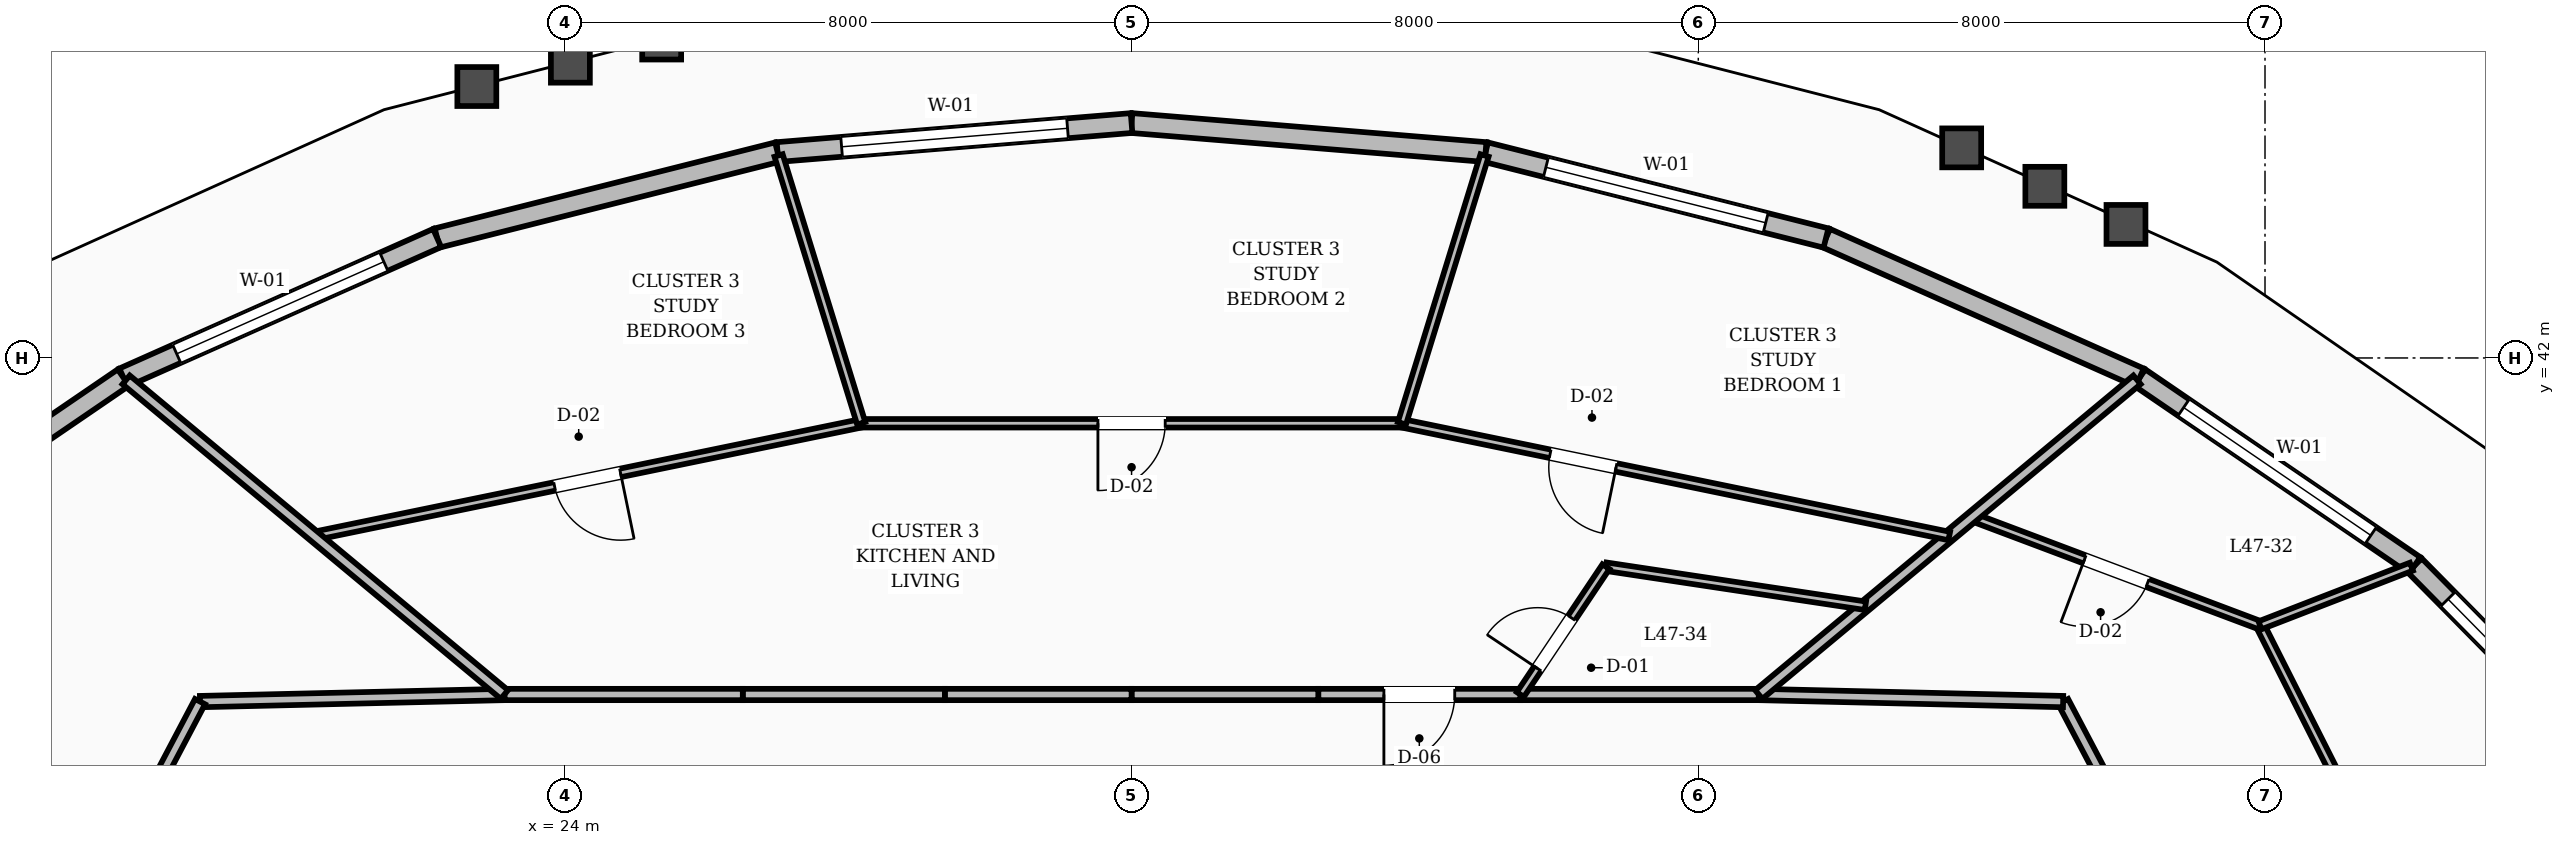
"""IFC4 building model, lengths in metres.
Left out: names, types, materials, properties, quantities, classifications, styles, units other than length and angle.
Written with IfcOpenShell. Run it as: python <this file> out.ifc"""

import sys

from ifc_helpers import new_model, si_unit, direction, frame, frame_2d, origin, place, context, subcontext, project, spatial, rectangle, extrude, element, fill, save


model = new_model("IFC4")
c1 = context("Model", 3, precision=1e-05, world=origin(), true_north=direction((0.0, 1.0)))
c2 = subcontext(c1, "Body", "Model", "MODEL_VIEW")
j1 = project(units=[si_unit("LENGTHUNIT", "METRE"), si_unit("PLANEANGLEUNIT", "RADIAN")], contexts=[c1])
p1 = place(None, origin())
s1 = spatial("IfcSite", under=j1, at=p1, CompositionType="ELEMENT")
p2 = place(p1, origin())
s2 = spatial("IfcBuilding", under=s1, at=p2, CompositionType="ELEMENT")
p3 = place(p2, frame((0.0, 0.0, 182.0)))
s3 = spatial("IfcBuildingStorey", under=s2, at=p3, CompositionType="ELEMENT", Elevation=182.0)
p4 = place(p3, frame((53.299, 35.842, 0.0), z_axis=(0.0, 0.0, 1.0), x_axis=(-0.70219293187, 0.711986717876, 0.0)))
e1 = element("IfcWall", 1, at=p4, inside=s3, PredefinedType="STANDARD", context=c2, shape_type="SweptSolid", body=[
    extrude(rectangle(XDim=4.537, YDim=0.28, at=frame_2d((2.269, 0.0))), origin(), (0.0, 0.0, 1.0), 2.82),
])
p5 = place(p4, frame((0.668, 0.0, 0.8)))
e2 = element("IfcOpeningElement", 2, at=p5, cuts=e1, PredefinedType="OPENING", context=c2, shape_type="SweptSolid", body=[
    extrude(rectangle(XDim=3.2, YDim=1.65, at=frame_2d((1.6, 0.825))), frame((0.0, 0.15, 0.0), z_axis=(0.0, -1.0, 0.0), x_axis=(1.0, 0.0, 0.0)), (0.0, 0.0, 1.0), 0.3),
])
p6 = place(p3, frame((50.113, 39.073, 0.0), z_axis=(0.0, 0.0, 1.0), x_axis=(-0.825797441916, 0.563966829632, 0.0)))
e3 = element("IfcWall", 3, at=p6, inside=s3, PredefinedType="STANDARD", context=c2, shape_type="SweptSolid", body=[
    extrude(rectangle(XDim=4.7, YDim=0.28, at=frame_2d((2.35, 0.0))), origin(), (0.0, 0.0, 1.0), 2.82),
])
p7 = place(p6, frame((0.75, 0.0, 0.8)))
e4 = element("IfcOpeningElement", 4, at=p7, cuts=e3, PredefinedType="OPENING", context=c2, shape_type="SweptSolid", body=[
    extrude(rectangle(XDim=3.2, YDim=1.65, at=frame_2d((1.6, 0.825))), frame((0.0, 0.15, 0.0), z_axis=(0.0, -1.0, 0.0), x_axis=(1.0, 0.0, 0.0)), (0.0, 0.0, 1.0), 0.3),
])
p8 = place(p3, frame((46.232, 41.723, 0.0), z_axis=(0.0, 0.0, 1.0), x_axis=(-0.913703507389, 0.406381471754, 0.0)))
e5 = element("IfcWall", 5, at=p8, inside=s3, PredefinedType="STANDARD", context=c2, shape_type="SweptSolid", body=[
    extrude(rectangle(XDim=4.847, YDim=0.28, at=frame_2d((2.423, 0.0))), origin(), (0.0, 0.0, 1.0), 2.82),
])
p9 = place(p3, frame((41.803, 43.693, 0.0), z_axis=(0.0, 0.0, 1.0), x_axis=(-0.96958067748, 0.244771954803, 0.0)))
e6 = element("IfcWall", 6, at=p9, inside=s3, PredefinedType="STANDARD", context=c2, shape_type="SweptSolid", body=[
    extrude(rectangle(XDim=4.956, YDim=0.28, at=frame_2d((2.478, 0.0))), origin(), (0.0, 0.0, 1.0), 2.82),
])
p10 = place(p9, frame((0.878, 0.0, 0.8)))
e7 = element("IfcOpeningElement", 7, at=p10, cuts=e6, PredefinedType="OPENING", context=c2, shape_type="SweptSolid", body=[
    extrude(rectangle(XDim=3.2, YDim=1.65, at=frame_2d((1.6, 0.825))), frame((0.0, 0.15, 0.0), z_axis=(0.0, -1.0, 0.0), x_axis=(1.0, 0.0, 0.0)), (0.0, 0.0, 1.0), 0.3),
])
p11 = place(p3, frame((36.998, 44.906, 0.0), z_axis=(0.0, 0.0, 1.0), x_axis=(-0.996657001312, 0.081699582228, 0.0)))
e8 = element("IfcWall", 8, at=p11, inside=s3, PredefinedType="STANDARD", context=c2, shape_type="SweptSolid", body=[
    extrude(rectangle(XDim=5.014, YDim=0.28, at=frame_2d((2.507, 0.0))), origin(), (0.0, 0.0, 1.0), 2.82),
])
p12 = place(p3, frame((32.0, 45.316, 0.0), z_axis=(0.0, 0.0, 1.0), x_axis=(-0.996657001312, -0.081699582228, 0.0)))
e9 = element("IfcWall", 9, at=p12, inside=s3, PredefinedType="STANDARD", context=c2, shape_type="SweptSolid", body=[
    extrude(rectangle(XDim=5.014, YDim=0.28, at=frame_2d((2.507, 0.0))), origin(), (0.0, 0.0, 1.0), 2.82),
])
p13 = place(p12, frame((0.907, 0.0, 0.8)))
e10 = element("IfcOpeningElement", 10, at=p13, cuts=e9, PredefinedType="OPENING", context=c2, shape_type="SweptSolid", body=[
    extrude(rectangle(XDim=3.2, YDim=1.65, at=frame_2d((1.6, 0.825))), frame((0.0, 0.15, 0.0), z_axis=(0.0, -1.0, 0.0), x_axis=(1.0, 0.0, 0.0)), (0.0, 0.0, 1.0), 0.3),
])
p14 = place(p3, frame((27.002, 44.906, 0.0), z_axis=(0.0, 0.0, 1.0), x_axis=(-0.96958067748, -0.244771954803, 0.0)))
e11 = element("IfcWall", 11, at=p14, inside=s3, PredefinedType="STANDARD", context=c2, shape_type="SweptSolid", body=[
    extrude(rectangle(XDim=4.956, YDim=0.28, at=frame_2d((2.478, 0.0))), origin(), (0.0, 0.0, 1.0), 2.82),
])
p15 = place(p3, frame((22.197, 43.693, 0.0), z_axis=(0.0, 0.0, 1.0), x_axis=(-0.913703507389, -0.406381471754, 0.0)))
e12 = element("IfcWall", 12, at=p15, inside=s3, PredefinedType="STANDARD", context=c2, shape_type="SweptSolid", body=[
    extrude(rectangle(XDim=4.847, YDim=0.28, at=frame_2d((2.423, 0.0))), origin(), (0.0, 0.0, 1.0), 2.82),
])
p16 = place(p15, frame((0.823, 0.0, 0.8)))
e13 = element("IfcOpeningElement", 13, at=p16, cuts=e12, PredefinedType="OPENING", context=c2, shape_type="SweptSolid", body=[
    extrude(rectangle(XDim=3.2, YDim=1.65, at=frame_2d((1.6, 0.825))), frame((0.0, 0.15, 0.0), z_axis=(0.0, -1.0, 0.0), x_axis=(1.0, 0.0, 0.0)), (0.0, 0.0, 1.0), 0.3),
])
p17 = place(p3, frame((17.768, 41.723, 0.0), z_axis=(0.0, 0.0, 1.0), x_axis=(-0.825797441916, -0.563966829632, 0.0)))
e14 = element("IfcWall", 14, at=p17, inside=s3, PredefinedType="STANDARD", context=c2, shape_type="SweptSolid", body=[
    extrude(rectangle(XDim=4.7, YDim=0.28, at=frame_2d((2.35, 0.0))), origin(), (0.0, 0.0, 1.0), 2.82),
])
p18 = place(p3, frame((46.85, 33.923, 0.0), z_axis=(0.0, 0.0, 1.0), x_axis=(-0.466093963429, 0.884735224378, 0.0)))
e15 = element("IfcWall", 15, at=p18, inside=s3, PredefinedType="SOLIDWALL", context=c2, shape_type="SweptSolid", body=[
    extrude(rectangle(XDim=3.648, YDim=0.16, at=frame_2d((1.824, 0.0))), origin(), (0.0, 0.0, 1.0), 2.8),
])
p19 = place(p3, frame((45.15, 37.15, 0.0), z_axis=(0.0, 0.0, 1.0), x_axis=(-0.999728709658, 0.023291781507, 0.0)))
e16 = element("IfcWall", 16, at=p19, inside=s3, PredefinedType="SOLIDWALL", context=c2, shape_type="SweptSolid", body=[
    extrude(rectangle(XDim=4.298, YDim=0.16, at=frame_2d((2.149, 0.0))), origin(), (0.0, 0.0, 1.0), 2.8),
])
p20 = place(p3, frame((40.854, 37.25, 0.0), z_axis=(0.0, 0.0, 1.0), x_axis=(-1.0, 0.0, 0.0)))
e17 = element("IfcWall", 17, at=p20, inside=s3, PredefinedType="SOLIDWALL", context=c2, shape_type="SweptSolid", body=[
    extrude(rectangle(XDim=3.365, YDim=0.16, at=frame_2d((1.683, 0.0))), origin(), (0.0, 0.0, 1.0), 2.8),
])
p21 = place(p3, frame((37.488, 37.25, 0.0), z_axis=(0.0, 0.0, 1.0), x_axis=(-1.0, 0.0, 0.0)))
e18 = element("IfcWall", 18, at=p21, inside=s3, PredefinedType="SOLIDWALL", context=c2, shape_type="SweptSolid", body=[
    extrude(rectangle(XDim=2.853, YDim=0.16, at=frame_2d((1.426, 0.0))), origin(), (0.0, 0.0, 1.0), 2.8),
])
p22 = place(p21, frame((0.927, 0.0, 0.0)))
e19 = element("IfcOpeningElement", 19, at=p22, cuts=e18, PredefinedType="OPENING", context=c2, shape_type="SweptSolid", body=[
    extrude(rectangle(XDim=1.0, YDim=2.1, at=frame_2d((0.5, 1.05))), frame((0.0, 0.09, 0.0), z_axis=(0.0, -1.0, 0.0), x_axis=(1.0, 0.0, 0.0)), (0.0, 0.0, 1.0), 0.18),
])
for number, where, z_axis, x_axis in (
    (20, (34.635, 37.25, 0.0), (0.0, 0.0, 1.0), (-1.0, 0.0, 0.0)),
    (21, (32.0, 37.25, 0.0), (0.0, 0.0, 1.0), (-1.0, 0.0, 0.0)),
):
    element("IfcWall", number, at=place(p3, frame(where, z_axis=z_axis, x_axis=x_axis)), inside=s3, PredefinedType="SOLIDWALL", context=c2, shape_type="SweptSolid", body=[
        extrude(rectangle(XDim=2.635, YDim=0.16, at=frame_2d((1.318, 0.0))), origin(), (0.0, 0.0, 1.0), 2.8),
    ])
p23 = place(p3, frame((29.365, 37.25, 0.0), z_axis=(0.0, 0.0, 1.0), x_axis=(-1.0, 0.0, 0.0)))
e22 = element("IfcWall", 22, at=p23, inside=s3, PredefinedType="SOLIDWALL", context=c2, shape_type="SweptSolid", body=[
    extrude(rectangle(XDim=2.853, YDim=0.16, at=frame_2d((1.426, 0.0))), origin(), (0.0, 0.0, 1.0), 2.8),
])
p24 = place(p3, frame((26.512, 37.25, 0.0), z_axis=(0.0, 0.0, 1.0), x_axis=(-1.0, 0.0, 0.0)))
e23 = element("IfcWall", 23, at=p24, inside=s3, PredefinedType="SOLIDWALL", context=c2, shape_type="SweptSolid", body=[
    extrude(rectangle(XDim=3.365, YDim=0.16, at=frame_2d((1.683, 0.0))), origin(), (0.0, 0.0, 1.0), 2.8),
])
p25 = place(p3, frame((23.146, 37.25, 0.0), z_axis=(0.0, 0.0, 1.0), x_axis=(-0.999728709658, -0.023291781507, 0.0)))
e24 = element("IfcWall", 24, at=p25, inside=s3, PredefinedType="SOLIDWALL", context=c2, shape_type="SweptSolid", body=[
    extrude(rectangle(XDim=4.298, YDim=0.16, at=frame_2d((2.149, 0.0))), origin(), (0.0, 0.0, 1.0), 2.8),
])
p26 = place(p3, frame((18.85, 37.15, 0.0), z_axis=(0.0, 0.0, 1.0), x_axis=(-0.466093963429, -0.884735224378, 0.0)))
e25 = element("IfcWall", 25, at=p26, inside=s3, PredefinedType="SOLIDWALL", context=c2, shape_type="SweptSolid", body=[
    extrude(rectangle(XDim=3.648, YDim=0.16, at=frame_2d((1.824, 0.0))), origin(), (0.0, 0.0, 1.0), 2.8),
])
p27 = place(p3, frame((51.497, 31.155, 0.0), z_axis=(0.0, 0.0, 1.0), x_axis=(-0.450428488071, 0.892812509508, 0.0)))
e26 = element("IfcWall", 26, at=p27, inside=s3, PredefinedType="PARTITIONING", context=c2, shape_type="SweptSolid", body=[
    extrude(rectangle(XDim=7.921, YDim=0.12, at=frame_2d((3.96, 0.0))), origin(), (0.0, 0.0, 1.0), 2.8),
])
p28 = place(p27, frame((3.486, 0.0, 0.0)))
e27 = element("IfcOpeningElement", 27, at=p28, cuts=e26, PredefinedType="OPENING", context=c2, shape_type="SweptSolid", body=[
    extrude(rectangle(XDim=0.95, YDim=2.1, at=frame_2d((0.475, 1.05))), frame((0.0, 0.07, 0.0), z_axis=(0.0, -1.0, 0.0), x_axis=(1.0, 0.0, 0.0)), (0.0, 0.0, 1.0), 0.14),
])
p29 = place(p3, frame((47.929, 38.227, 0.0), z_axis=(0.0, 0.0, 1.0), x_axis=(-0.935989074673, 0.352029050071, 0.0)))
e28 = element("IfcWall", 28, at=p29, inside=s3, PredefinedType="PARTITIONING", context=c2, shape_type="SweptSolid", body=[
    extrude(rectangle(XDim=4.342, YDim=0.12, at=frame_2d((2.171, 0.0))), origin(), (0.0, 0.0, 1.0), 2.8),
])
p30 = place(p29, frame((1.696, 0.0, 0.0)))
e29 = element("IfcOpeningElement", 29, at=p30, cuts=e28, PredefinedType="OPENING", context=c2, shape_type="SweptSolid", body=[
    extrude(rectangle(XDim=0.95, YDim=2.1, at=frame_2d((0.475, 1.05))), frame((0.0, 0.07, 0.0), z_axis=(0.0, -1.0, 0.0), x_axis=(1.0, 0.0, 0.0)), (0.0, 0.0, 1.0), 0.14),
])
p31 = place(p3, frame((47.929, 38.227, 0.0), z_axis=(0.0, 0.0, 1.0), x_axis=(0.932497523424, 0.36117636801, 0.0)))
e30 = element("IfcWall", 30, at=p31, inside=s3, PredefinedType="PARTITIONING", context=c2, shape_type="SweptSolid", body=[
    extrude(rectangle(XDim=2.292, YDim=0.12, at=frame_2d((1.146, 0.0))), origin(), (0.0, 0.0, 1.0), 2.8),
])
p32 = place(p3, frame((40.854, 37.25, 0.0), z_axis=(0.0, 0.0, 1.0), x_axis=(0.768805862504, 0.639482248213, 0.0)))
e31 = element("IfcWall", 31, at=p32, inside=s3, PredefinedType="SOLIDWALL", context=c2, shape_type="SweptSolid", body=[
    extrude(rectangle(XDim=6.945, YDim=0.16, at=frame_2d((3.473, 0.0))), origin(), (0.0, 0.0, 1.0), 2.8),
])
p33 = place(p3, frame((42.359, 38.503, 0.0), z_axis=(0.0, 0.0, 1.0), x_axis=(-0.988854990304, 0.148881859711, 0.0)))
e32 = element("IfcWall", 32, at=p33, inside=s3, PredefinedType="PARTITIONING", context=c2, shape_type="SweptSolid", body=[
    extrude(rectangle(XDim=3.704, YDim=0.12, at=frame_2d((1.852, 0.0))), origin(), (0.0, 0.0, 1.0), 2.8),
])
p34 = place(p3, frame((37.488, 37.25, 0.0), z_axis=(0.0, 0.0, 1.0), x_axis=(0.556359763528, 0.830941522327, 0.0)))
e33 = element("IfcWall", 33, at=p34, inside=s3, PredefinedType="PARTITIONING", context=c2, shape_type="SweptSolid", body=[
    extrude(rectangle(XDim=2.171, YDim=0.12, at=frame_2d((1.086, 0.0))), origin(), (0.0, 0.0, 1.0), 2.8),
])
p35 = place(p34, frame((0.44, 0.0, 0.0)))
e34 = element("IfcOpeningElement", 34, at=p35, cuts=e33, PredefinedType="OPENING", context=c2, shape_type="SweptSolid", body=[
    extrude(rectangle(XDim=0.86, YDim=2.1, at=frame_2d((0.43, 1.05))), frame((0.0, 0.07, 0.0), z_axis=(0.0, -1.0, 0.0), x_axis=(1.0, 0.0, 0.0)), (0.0, 0.0, 1.0), 0.14),
])
p36 = place(p3, frame((43.542, 39.487, 0.0), z_axis=(0.0, 0.0, 1.0), x_axis=(-0.979440858822, 0.201731514814, 0.0)))
e35 = element("IfcWall", 35, at=p36, inside=s3, PredefinedType="PARTITIONING", context=c2, shape_type="SweptSolid", body=[
    extrude(rectangle(XDim=7.888, YDim=0.12, at=frame_2d((3.944, 0.0))), origin(), (0.0, 0.0, 1.0), 2.8),
])
p37 = place(p36, frame((4.802, 0.0, 0.0)))
e36 = element("IfcOpeningElement", 36, at=p37, cuts=e35, PredefinedType="OPENING", context=c2, shape_type="SweptSolid", body=[
    extrude(rectangle(XDim=0.95, YDim=2.1, at=frame_2d((0.475, 1.05))), frame((0.0, 0.07, 0.0), z_axis=(0.0, -1.0, 0.0), x_axis=(1.0, 0.0, 0.0)), (0.0, 0.0, 1.0), 0.14),
])
p38 = place(p3, frame((35.816, 41.078, 0.0), z_axis=(0.0, 0.0, 1.0), x_axis=(-1.0, 0.0, 0.0)))
e37 = element("IfcWall", 37, at=p38, inside=s3, PredefinedType="PARTITIONING", context=c2, shape_type="SweptSolid", body=[
    extrude(rectangle(XDim=7.633, YDim=0.12, at=frame_2d((3.816, 0.0))), origin(), (0.0, 0.0, 1.0), 2.8),
])
p39 = place(p38, frame((3.342, 0.0, 0.0)))
e38 = element("IfcOpeningElement", 38, at=p39, cuts=e37, PredefinedType="OPENING", context=c2, shape_type="SweptSolid", body=[
    extrude(rectangle(XDim=0.95, YDim=2.1, at=frame_2d((0.475, 1.05))), frame((0.0, 0.07, 0.0), z_axis=(0.0, -1.0, 0.0), x_axis=(1.0, 0.0, 0.0)), (0.0, 0.0, 1.0), 0.14),
])
p40 = place(p3, frame((35.816, 41.078, 0.0), z_axis=(0.0, 0.0, 1.0), x_axis=(0.294857647308, 0.955541191066, 0.0)))
e39 = element("IfcWall", 39, at=p40, inside=s3, PredefinedType="PARTITIONING", context=c2, shape_type="SweptSolid", body=[
    extrude(rectangle(XDim=3.956, YDim=0.12, at=frame_2d((1.978, 0.0))), origin(), (0.0, 0.0, 1.0), 2.8),
])
p41 = place(p3, frame((28.184, 41.078, 0.0), z_axis=(0.0, 0.0, 1.0), x_axis=(-0.979440858822, -0.201731514814, 0.0)))
e40 = element("IfcWall", 40, at=p41, inside=s3, PredefinedType="PARTITIONING", context=c2, shape_type="SweptSolid", body=[
    extrude(rectangle(XDim=7.888, YDim=0.12, at=frame_2d((3.944, 0.0))), origin(), (0.0, 0.0, 1.0), 2.8),
])
p42 = place(p41, frame((3.469, 0.0, 0.0)))
e41 = element("IfcOpeningElement", 41, at=p42, cuts=e40, PredefinedType="OPENING", context=c2, shape_type="SweptSolid", body=[
    extrude(rectangle(XDim=0.95, YDim=2.1, at=frame_2d((0.475, 1.05))), frame((0.0, 0.07, 0.0), z_axis=(0.0, -1.0, 0.0), x_axis=(1.0, 0.0, 0.0)), (0.0, 0.0, 1.0), 0.14),
])
p43 = place(p3, frame((28.184, 41.078, 0.0), z_axis=(0.0, 0.0, 1.0), x_axis=(-0.294857647308, 0.955541191066, 0.0)))
e42 = element("IfcWall", 42, at=p43, inside=s3, PredefinedType="PARTITIONING", context=c2, shape_type="SweptSolid", body=[
    extrude(rectangle(XDim=3.956, YDim=0.12, at=frame_2d((1.978, 0.0))), origin(), (0.0, 0.0, 1.0), 2.8),
])
p44 = place(p3, frame((23.146, 37.25, 0.0), z_axis=(0.0, 0.0, 1.0), x_axis=(-0.768805862504, 0.639482248213, 0.0)))
e43 = element("IfcWall", 43, at=p44, inside=s3, PredefinedType="SOLIDWALL", context=c2, shape_type="SweptSolid", body=[
    extrude(rectangle(XDim=6.945, YDim=0.16, at=frame_2d((3.473, 0.0))), origin(), (0.0, 0.0, 1.0), 2.8),
])
p45 = place(p5, origin())
e44 = element("IfcWindow", 44, at=p45, inside=s3, PartitioningType="SINGLE_PANEL", PredefinedType="WINDOW", context=c2, shape_type="SweptSolid", body=[
    extrude(rectangle(XDim=3.2, YDim=1.65, at=frame_2d((1.6, 0.825))), frame((0.0, 0.03, 0.0), z_axis=(0.0, -1.0, 0.0), x_axis=(1.0, 0.0, 0.0)), (0.0, 0.0, 1.0), 0.06),
])
fill(e2, e44)
p46 = place(p7, origin())
e45 = element("IfcWindow", 45, at=p46, inside=s3, PartitioningType="SINGLE_PANEL", PredefinedType="WINDOW", context=c2, shape_type="SweptSolid", body=[
    extrude(rectangle(XDim=3.2, YDim=1.65, at=frame_2d((1.6, 0.825))), frame((0.0, 0.03, 0.0), z_axis=(0.0, -1.0, 0.0), x_axis=(1.0, 0.0, 0.0)), (0.0, 0.0, 1.0), 0.06),
])
fill(e4, e45)
p47 = place(p10, origin())
e46 = element("IfcWindow", 46, at=p47, inside=s3, PartitioningType="SINGLE_PANEL", PredefinedType="WINDOW", context=c2, shape_type="SweptSolid", body=[
    extrude(rectangle(XDim=3.2, YDim=1.65, at=frame_2d((1.6, 0.825))), frame((0.0, 0.03, 0.0), z_axis=(0.0, -1.0, 0.0), x_axis=(1.0, 0.0, 0.0)), (0.0, 0.0, 1.0), 0.06),
])
fill(e7, e46)
p48 = place(p13, origin())
e47 = element("IfcWindow", 47, at=p48, inside=s3, PartitioningType="SINGLE_PANEL", PredefinedType="WINDOW", context=c2, shape_type="SweptSolid", body=[
    extrude(rectangle(XDim=3.2, YDim=1.65, at=frame_2d((1.6, 0.825))), frame((0.0, 0.03, 0.0), z_axis=(0.0, -1.0, 0.0), x_axis=(1.0, 0.0, 0.0)), (0.0, 0.0, 1.0), 0.06),
])
fill(e10, e47)
p49 = place(p16, origin())
e48 = element("IfcWindow", 48, at=p49, inside=s3, PartitioningType="SINGLE_PANEL", PredefinedType="WINDOW", context=c2, shape_type="SweptSolid", body=[
    extrude(rectangle(XDim=3.2, YDim=1.65, at=frame_2d((1.6, 0.825))), frame((0.0, 0.03, 0.0), z_axis=(0.0, -1.0, 0.0), x_axis=(1.0, 0.0, 0.0)), (0.0, 0.0, 1.0), 0.06),
])
fill(e13, e48)
p50 = place(p30, origin())
e49 = element("IfcDoor", 49, at=p50, inside=s3, OperationType="SINGLE_SWING_RIGHT", PredefinedType="DOOR", context=c2, shape_type="SweptSolid", body=[
    extrude(rectangle(XDim=0.95, YDim=2.1, at=frame_2d((0.475, 1.05))), frame((0.0, 0.025, 0.0), z_axis=(0.0, -1.0, 0.0), x_axis=(1.0, 0.0, 0.0)), (0.0, 0.0, 1.0), 0.05),
])
fill(e29, e49)
p51 = place(p35, origin())
e50 = element("IfcDoor", 50, at=p51, inside=s3, OperationType="SINGLE_SWING_LEFT", PredefinedType="DOOR", context=c2, shape_type="SweptSolid", body=[
    extrude(rectangle(XDim=0.86, YDim=2.1, at=frame_2d((0.43, 1.05))), frame((0.0, 0.025, 0.0), z_axis=(0.0, -1.0, 0.0), x_axis=(1.0, 0.0, 0.0)), (0.0, 0.0, 1.0), 0.05),
])
fill(e34, e50)
p52 = place(p22, origin())
e51 = element("IfcDoor", 51, at=p52, inside=s3, OperationType="SINGLE_SWING_RIGHT", PredefinedType="DOOR", context=c2, shape_type="SweptSolid", body=[
    extrude(rectangle(XDim=1.0, YDim=2.1, at=frame_2d((0.5, 1.05))), frame((0.0, 0.025, 0.0), z_axis=(0.0, -1.0, 0.0), x_axis=(1.0, 0.0, 0.0)), (0.0, 0.0, 1.0), 0.05),
])
fill(e19, e51)
p53 = place(p37, origin())
e52 = element("IfcDoor", 52, at=p53, inside=s3, OperationType="SINGLE_SWING_LEFT", PredefinedType="DOOR", context=c2, shape_type="SweptSolid", body=[
    extrude(rectangle(XDim=0.95, YDim=2.1, at=frame_2d((0.475, 1.05))), frame((0.0, 0.025, 0.0), z_axis=(0.0, -1.0, 0.0), x_axis=(1.0, 0.0, 0.0)), (0.0, 0.0, 1.0), 0.05),
])
fill(e36, e52)
p54 = place(p39, origin())
e53 = element("IfcDoor", 53, at=p54, inside=s3, OperationType="SINGLE_SWING_RIGHT", PredefinedType="DOOR", context=c2, shape_type="SweptSolid", body=[
    extrude(rectangle(XDim=0.95, YDim=2.1, at=frame_2d((0.475, 1.05))), frame((0.0, 0.025, 0.0), z_axis=(0.0, -1.0, 0.0), x_axis=(1.0, 0.0, 0.0)), (0.0, 0.0, 1.0), 0.05),
])
fill(e38, e53)
p55 = place(p42, origin())
e54 = element("IfcDoor", 54, at=p55, inside=s3, OperationType="SINGLE_SWING_LEFT", PredefinedType="DOOR", context=c2, shape_type="SweptSolid", body=[
    extrude(rectangle(XDim=0.95, YDim=2.1, at=frame_2d((0.475, 1.05))), frame((0.0, 0.025, 0.0), z_axis=(0.0, -1.0, 0.0), x_axis=(1.0, 0.0, 0.0)), (0.0, 0.0, 1.0), 0.05),
])
fill(e41, e54)
save(model, sys.argv[1])
